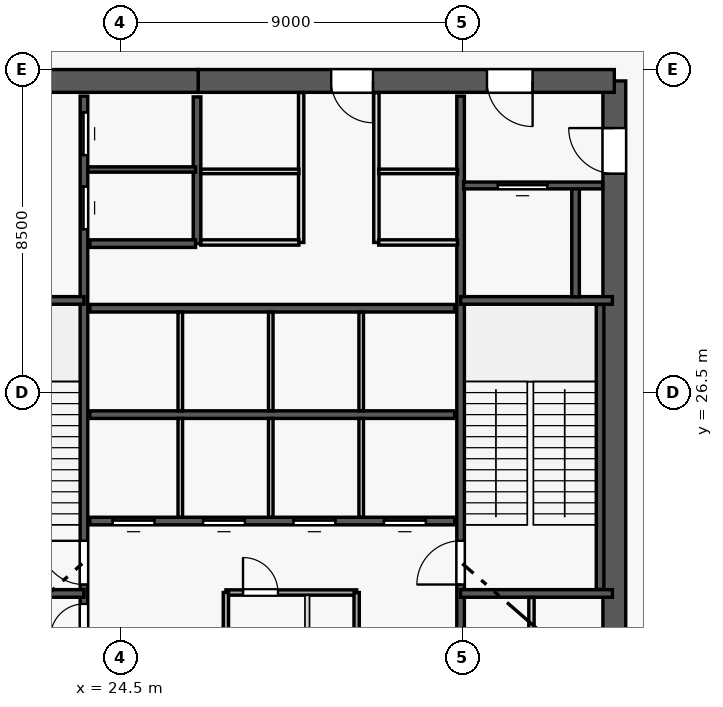
"""IFC4 building model, lengths in metres.
Left out: names, types, materials, properties, quantities, classifications, styles, units other than length and angle.
Written with IfcOpenShell. Run it as: python <this file> out.ifc"""

import sys

from ifc_helpers import new_model, si_unit, direction, frame, frame_2d, origin, origin_with_axes, origin_2d, place, context, subcontext, project, spatial, rectangle, circle, extrude, source, transform, mapped, element, fill, save


model = new_model("IFC4")
c1 = context("Model", 3, precision=1e-05, world=origin(), true_north=direction((0.0, 1.0)))
c2 = subcontext(c1, "Body", "Model", "MODEL_VIEW")
j1 = project(units=[si_unit("LENGTHUNIT", "METRE"), si_unit("PLANEANGLEUNIT", "RADIAN")], contexts=[c1])
p1 = place(None, origin())
s1 = spatial("IfcSite", under=j1, at=p1, CompositionType="ELEMENT")
p2 = place(p1, origin())
s2 = spatial("IfcBuilding", under=s1, at=p2, CompositionType="ELEMENT")
p3 = place(p2, frame((0.0, 0.0, 9.0)))
s3 = spatial("IfcBuildingStorey", under=s2, at=p3, CompositionType="ELEMENT", Elevation=9.0)
p4 = place(p3, frame((37.5, 18.3, 0.0), z_axis=(0.0, 0.0, 1.0), x_axis=(0.0, 1.0, 0.0)))
e1 = element("IfcWall", 1, at=p4, inside=s3, PredefinedType="SHEAR", context=c2, shape_type="SweptSolid", body=[
    extrude(rectangle(XDim=16.4, YDim=0.6, at=frame_2d((8.2, 0.0))), origin(), (0.0, 0.0, 1.0), 4.2),
])
p5 = place(p4, frame((13.96, 0.0, 0.0)))
e2 = element("IfcOpeningElement", 2, at=p5, cuts=e1, PredefinedType="OPENING", context=c2, shape_type="SweptSolid", body=[
    extrude(rectangle(XDim=1.2, YDim=2.15, at=frame_2d((0.6, 1.075))), frame((0.0, 0.31, 0.0), z_axis=(0.0, -1.0, 0.0), x_axis=(1.0, 0.0, 0.0)), (0.0, 0.0, 1.0), 0.62),
])
p6 = place(p3, frame((37.5, 34.7, 0.0), z_axis=(0.0, 0.0, 1.0), x_axis=(-1.0, 0.0, 0.0)))
e3 = element("IfcWall", 3, at=p6, inside=s3, PredefinedType="SHEAR", context=c2, shape_type="SweptSolid", body=[
    extrude(rectangle(XDim=10.95, YDim=0.6, at=frame_2d((5.475, 0.0))), origin(), (0.0, 0.0, 1.0), 4.2),
])
p7 = place(p6, frame((2.15, 0.0, 0.0)))
e4 = element("IfcOpeningElement", 4, at=p7, cuts=e3, PredefinedType="OPENING", context=c2, shape_type="SweptSolid", body=[
    extrude(rectangle(XDim=1.2, YDim=2.15, at=frame_2d((0.6, 1.075))), frame((0.0, 0.31, 0.0), z_axis=(0.0, -1.0, 0.0), x_axis=(1.0, 0.0, 0.0)), (0.0, 0.0, 1.0), 0.62),
])
p8 = place(p6, frame((6.35, 0.0, 0.0)))
e5 = element("IfcOpeningElement", 5, at=p8, cuts=e3, PredefinedType="OPENING", context=c2, shape_type="SweptSolid", body=[
    extrude(rectangle(XDim=1.1, YDim=2.15, at=frame_2d((0.55, 1.075))), frame((0.0, 0.31, 0.0), z_axis=(0.0, -1.0, 0.0), x_axis=(1.0, 0.0, 0.0)), (0.0, 0.0, 1.0), 0.62),
])
p9 = place(p3, frame((26.55, 34.7, 0.0), z_axis=(0.0, 0.0, 1.0), x_axis=(-1.0, 0.0, 0.0)))
e6 = element("IfcWall", 6, at=p9, inside=s3, PredefinedType="SHEAR", context=c2, shape_type="SweptSolid", body=[
    extrude(rectangle(XDim=7.05, YDim=0.6, at=frame_2d((3.525, 0.0))), origin(), (0.0, 0.0, 1.0), 4.2),
])
p10 = place(p9, frame((4.25, 0.0, 0.0)))
e7 = element("IfcOpeningElement", 7, at=p10, cuts=e6, PredefinedType="OPENING", context=c2, shape_type="SweptSolid", body=[
    extrude(rectangle(XDim=1.1, YDim=2.15, at=frame_2d((0.55, 1.075))), frame((0.0, 0.31, 0.0), z_axis=(0.0, -1.0, 0.0), x_axis=(1.0, 0.0, 0.0)), (0.0, 0.0, 1.0), 0.62),
])
m1 = source(origin_with_axes(), c2, "Body", "SweptSolid", [
    extrude(circle(Radius=0.9, at=origin_2d()), origin(), (0.0, 0.0, 1.0), 4.5),
])
for number, where, z_axis, x_axis in (
    (8, (26.55, 34.7, 0.0), (0.0, 0.0, 1.0), (1.0, 0.0, 0.0)),
    (9, (37.5, 34.7, 0.0), (0.0, 0.0, 1.0), (1.0, 0.0, 0.0)),
):
    element("IfcColumn", number, at=place(p3, frame(where, z_axis=z_axis, x_axis=x_axis)), inside=s3, PredefinedType="COLUMN", context=c2, shape_type="MappedRepresentation", body=[
        mapped(m1, transform((0.0, 0.0, 0.0), scale=1.0)),
    ])
m2 = source(origin_with_axes(), c2, "Body", "SweptSolid", [
    extrude(rectangle(XDim=1.2, YDim=1.2, at=origin_2d()), origin(), (0.0, 0.0, 1.0), 4.5),
])
for number, where, z_axis, x_axis in (
    (10, (23.55, 29.0, 0.0), (0.0, 0.0, 1.0), (1.0, 0.0, 0.0)),
    (11, (33.45, 29.0, 0.0), (0.0, 0.0, 1.0), (1.0, 0.0, 0.0)),
):
    element("IfcColumn", number, at=place(p3, frame(where, z_axis=z_axis, x_axis=x_axis)), inside=s3, PredefinedType="COLUMN", context=c2, shape_type="MappedRepresentation", body=[
        mapped(m2, transform((0.0, 0.0, 0.0), scale=1.0)),
    ])
p11 = place(p3, frame((23.545, 18.7, 0.0), z_axis=(0.0, 0.0, 1.0), x_axis=(0.0, 1.0, 0.0)))
e12 = element("IfcWall", 12, at=p11, inside=s3, PredefinedType="SHEAR", context=c2, shape_type="SweptSolid", body=[
    extrude(rectangle(XDim=15.6, YDim=0.2, at=frame_2d((7.8, 0.0))), origin(), (0.0, 0.0, 1.0), 4.2),
])
p12 = place(p11, frame((2.75, 0.0, 0.0)))
e13 = element("IfcOpeningElement", 13, at=p12, cuts=e12, PredefinedType="OPENING", context=c2, shape_type="SweptSolid", body=[
    extrude(rectangle(XDim=1.15, YDim=2.15, at=frame_2d((0.575, 1.075))), frame((0.0, 0.11, 0.0), z_axis=(0.0, -1.0, 0.0), x_axis=(1.0, 0.0, 0.0)), (0.0, 0.0, 1.0), 0.22),
])
p13 = place(p11, frame((0.14, 0.0, 0.0)))
e14 = element("IfcOpeningElement", 14, at=p13, cuts=e12, PredefinedType="OPENING", context=c2, shape_type="SweptSolid", body=[
    extrude(rectangle(XDim=0.88, YDim=2.1, at=frame_2d((0.44, 1.05))), frame((0.0, 0.11, 0.0), z_axis=(0.0, -1.0, 0.0), x_axis=(1.0, 0.0, 0.0)), (0.0, 0.0, 1.0), 0.22),
])
p14 = place(p11, frame((1.36, 0.0, 0.0)))
e15 = element("IfcOpeningElement", 15, at=p14, cuts=e12, PredefinedType="OPENING", context=c2, shape_type="SweptSolid", body=[
    extrude(rectangle(XDim=0.88, YDim=2.1, at=frame_2d((0.44, 1.05))), frame((0.0, 0.11, 0.0), z_axis=(0.0, -1.0, 0.0), x_axis=(1.0, 0.0, 0.0)), (0.0, 0.0, 1.0), 0.22),
])
p15 = place(p11, frame((12.1, 0.0, 0.0)))
e16 = element("IfcOpeningElement", 16, at=p15, cuts=e12, PredefinedType="OPENING", context=c2, shape_type="SweptSolid", body=[
    extrude(rectangle(XDim=1.12, YDim=2.15, at=frame_2d((0.56, 1.075))), frame((0.0, 0.11, 0.0), z_axis=(0.0, -1.0, 0.0), x_axis=(1.0, 0.0, 0.0)), (0.0, 0.0, 1.0), 0.22),
])
p16 = place(p11, frame((14.05, 0.0, 0.0)))
e17 = element("IfcOpeningElement", 17, at=p16, cuts=e12, PredefinedType="OPENING", context=c2, shape_type="SweptSolid", body=[
    extrude(rectangle(XDim=1.12, YDim=2.15, at=frame_2d((0.56, 1.075))), frame((0.0, 0.11, 0.0), z_axis=(0.0, -1.0, 0.0), x_axis=(1.0, 0.0, 0.0)), (0.0, 0.0, 1.0), 0.22),
])
p17 = place(p3, frame((33.455, 18.7, 0.0), z_axis=(0.0, 0.0, 1.0), x_axis=(0.0, 1.0, 0.0)))
e18 = element("IfcWall", 18, at=p17, inside=s3, PredefinedType="SHEAR", context=c2, shape_type="SweptSolid", body=[
    extrude(rectangle(XDim=15.6, YDim=0.2, at=frame_2d((7.8, 0.0))), origin(), (0.0, 0.0, 1.0), 4.2),
])
p18 = place(p17, frame((2.75, 0.0, 0.0)))
e19 = element("IfcOpeningElement", 19, at=p18, cuts=e18, PredefinedType="OPENING", context=c2, shape_type="SweptSolid", body=[
    extrude(rectangle(XDim=1.15, YDim=2.15, at=frame_2d((0.575, 1.075))), frame((0.0, 0.11, 0.0), z_axis=(0.0, -1.0, 0.0), x_axis=(1.0, 0.0, 0.0)), (0.0, 0.0, 1.0), 0.22),
])
p19 = place(p17, frame((0.55, 0.0, 0.0)))
e20 = element("IfcOpeningElement", 20, at=p19, cuts=e18, PredefinedType="OPENING", context=c2, shape_type="SweptSolid", body=[
    extrude(rectangle(XDim=0.94, YDim=2.1, at=frame_2d((0.47, 1.05))), frame((0.0, 0.11, 0.0), z_axis=(0.0, -1.0, 0.0), x_axis=(1.0, 0.0, 0.0)), (0.0, 0.0, 1.0), 0.22),
])
p20 = place(p3, frame((23.7, 23.12, 0.0), z_axis=(0.0, 0.0, 1.0), x_axis=(1.0, 0.0, 0.0)))
e21 = element("IfcWall", 21, at=p20, inside=s3, PredefinedType="SHEAR", context=c2, shape_type="SweptSolid", body=[
    extrude(rectangle(XDim=9.6, YDim=0.2, at=frame_2d((4.8, 0.0))), origin(), (0.0, 0.0, 1.0), 4.2),
])
p21 = place(p20, frame((0.6, 0.0, 0.0)))
e22 = element("IfcOpeningElement", 22, at=p21, cuts=e21, PredefinedType="OPENING", context=c2, shape_type="SweptSolid", body=[
    extrude(rectangle(XDim=1.1, YDim=2.15, at=frame_2d((0.55, 1.075))), frame((0.0, 0.11, 0.0), z_axis=(0.0, -1.0, 0.0), x_axis=(1.0, 0.0, 0.0)), (0.0, 0.0, 1.0), 0.22),
])
p22 = place(p20, frame((2.98, 0.0, 0.0)))
e23 = element("IfcOpeningElement", 23, at=p22, cuts=e21, PredefinedType="OPENING", context=c2, shape_type="SweptSolid", body=[
    extrude(rectangle(XDim=1.1, YDim=2.15, at=frame_2d((0.55, 1.075))), frame((0.0, 0.11, 0.0), z_axis=(0.0, -1.0, 0.0), x_axis=(1.0, 0.0, 0.0)), (0.0, 0.0, 1.0), 0.22),
])
p23 = place(p20, frame((5.36, 0.0, 0.0)))
e24 = element("IfcOpeningElement", 24, at=p23, cuts=e21, PredefinedType="OPENING", context=c2, shape_type="SweptSolid", body=[
    extrude(rectangle(XDim=1.1, YDim=2.15, at=frame_2d((0.55, 1.075))), frame((0.0, 0.11, 0.0), z_axis=(0.0, -1.0, 0.0), x_axis=(1.0, 0.0, 0.0)), (0.0, 0.0, 1.0), 0.22),
])
p24 = place(p20, frame((7.74, 0.0, 0.0)))
e25 = element("IfcOpeningElement", 25, at=p24, cuts=e21, PredefinedType="OPENING", context=c2, shape_type="SweptSolid", body=[
    extrude(rectangle(XDim=1.1, YDim=2.15, at=frame_2d((0.55, 1.075))), frame((0.0, 0.11, 0.0), z_axis=(0.0, -1.0, 0.0), x_axis=(1.0, 0.0, 0.0)), (0.0, 0.0, 1.0), 0.22),
])
for number, where, z_axis, x_axis in (
    (26, (23.7, 25.92, 0.0), (0.0, 0.0, 1.0), (1.0, 0.0, 0.0)),
    (27, (23.7, 28.72, 0.0), (0.0, 0.0, 1.0), (1.0, 0.0, 0.0)),
):
    element("IfcWall", number, at=place(p3, frame(where, z_axis=z_axis, x_axis=x_axis)), inside=s3, PredefinedType="SHEAR", context=c2, shape_type="SweptSolid", body=[
        extrude(rectangle(XDim=9.6, YDim=0.2, at=frame_2d((4.8, 0.0))), origin(), (0.0, 0.0, 1.0), 4.2),
    ])
p25 = place(p3, frame((37.125, 21.32, 0.0), z_axis=(0.0, 0.0, 1.0), x_axis=(0.0, 1.0, 0.0)))
e28 = element("IfcWall", 28, at=p25, inside=s3, PredefinedType="SHEAR", context=c2, shape_type="SweptSolid", body=[
    extrude(rectangle(XDim=7.5, YDim=0.2, at=frame_2d((3.75, 0.0))), origin(), (0.0, 0.0, 1.0), 4.2),
])
for number, where, z_axis, x_axis in (
    (29, (33.455, 21.215, 0.0), (0.0, 0.0, 1.0), (1.0, 0.0, 0.0)),
    (30, (33.455, 28.925, 0.0), (0.0, 0.0, 1.0), (1.0, 0.0, 0.0)),
    (31, (19.55, 21.215, 0.0), (0.0, 0.0, 1.0), (1.0, 0.0, 0.0)),
    (32, (19.55, 28.925, 0.0), (0.0, 0.0, 1.0), (1.0, 0.0, 0.0)),
):
    element("IfcWall", number, at=place(p3, frame(where, z_axis=z_axis, x_axis=x_axis)), inside=s3, PredefinedType="SHEAR", context=c2, shape_type="SweptSolid", body=[
        extrude(rectangle(XDim=3.995, YDim=0.2, at=frame_2d((1.998, 0.0))), origin(), (0.0, 0.0, 1.0), 4.2),
    ])
p26 = place(p3, frame((26.52, 30.42, 0.0), z_axis=(0.0, 0.0, 1.0), x_axis=(0.0, 1.0, 0.0)))
e33 = element("IfcWall", 33, at=p26, inside=s3, PredefinedType="SHEAR", context=c2, shape_type="SweptSolid", body=[
    extrude(rectangle(XDim=3.86, YDim=0.2, at=frame_2d((1.93, 0.0))), origin(), (0.0, 0.0, 1.0), 4.2),
])
p27 = place(p3, frame((36.48, 29.02, 0.0), z_axis=(0.0, 0.0, 1.0), x_axis=(0.0, 1.0, 0.0)))
e34 = element("IfcWall", 34, at=p27, inside=s3, PredefinedType="SHEAR", context=c2, shape_type="SweptSolid", body=[
    extrude(rectangle(XDim=2.86, YDim=0.2, at=frame_2d((1.43, 0.0))), origin(), (0.0, 0.0, 1.0), 4.2),
])
p28 = place(p3, frame((23.7, 30.42, 0.0), z_axis=(0.0, 0.0, 1.0), x_axis=(1.0, 0.0, 0.0)))
e35 = element("IfcWall", 35, at=p28, inside=s3, PredefinedType="SHEAR", context=c2, shape_type="SweptSolid", body=[
    extrude(rectangle(XDim=2.78, YDim=0.2, at=frame_2d((1.39, 0.0))), origin(), (0.0, 0.0, 1.0), 4.2),
])
for number, where, z_axis, x_axis in (
    (36, (29.26, 30.45, 0.0), (0.0, 0.0, 1.0), (0.0, 1.0, 0.0)),
    (37, (31.24, 30.45, 0.0), (0.0, 0.0, 1.0), (0.0, 1.0, 0.0)),
):
    element("IfcWall", number, at=place(p3, frame(where, z_axis=z_axis, x_axis=x_axis)), inside=s3, PredefinedType="PARTITIONING", context=c2, shape_type="SweptSolid", body=[
        extrude(rectangle(XDim=3.943, YDim=0.14, at=frame_2d((1.972, 0.0))), origin(), (0.0, 0.0, 1.0), 4.2),
    ])
p29 = place(p3, frame((33.535, 31.95, 0.0), z_axis=(0.0, 0.0, 1.0), x_axis=(1.0, 0.0, 0.0)))
e38 = element("IfcWall", 38, at=p29, inside=s3, PredefinedType="PARTITIONING", context=c2, shape_type="SweptSolid", body=[
    extrude(rectangle(XDim=3.658, YDim=0.18, at=frame_2d((1.829, 0.0))), origin(), (0.0, 0.0, 1.0), 4.2),
])
p30 = place(p29, frame((0.9, 0.0, 0.0)))
e39 = element("IfcOpeningElement", 39, at=p30, cuts=e38, PredefinedType="OPENING", context=c2, shape_type="SweptSolid", body=[
    extrude(rectangle(XDim=1.3, YDim=2.2, at=frame_2d((0.65, 1.1))), frame((0.0, 0.1, 0.0), z_axis=(0.0, -1.0, 0.0), x_axis=(1.0, 0.0, 0.0)), (0.0, 0.0, 1.0), 0.2),
])
p31 = place(p3, frame((27.28, 21.24, 0.0), z_axis=(0.0, 0.0, 1.0), x_axis=(1.0, 0.0, 0.0)))
e40 = element("IfcWall", 40, at=p31, inside=s3, PredefinedType="PARTITIONING", context=c2, shape_type="SweptSolid", body=[
    extrude(rectangle(XDim=3.44, YDim=0.14, at=frame_2d((1.72, 0.0))), origin(), (0.0, 0.0, 1.0), 4.2),
])
p32 = place(p31, frame((0.45, 0.0, 0.0)))
e41 = element("IfcOpeningElement", 41, at=p32, cuts=e40, PredefinedType="OPENING", context=c2, shape_type="SweptSolid", body=[
    extrude(rectangle(XDim=0.92, YDim=2.1, at=frame_2d((0.46, 1.05))), frame((0.0, 0.08, 0.0), z_axis=(0.0, -1.0, 0.0), x_axis=(1.0, 0.0, 0.0)), (0.0, 0.0, 1.0), 0.16),
])
p33 = place(p3, frame((23.652, 32.37, 0.0), z_axis=(0.0, 0.0, 1.0), x_axis=(1.0, 0.0, 0.0)))
e42 = element("IfcWall", 42, at=p33, inside=s3, PredefinedType="PARTITIONING", context=c2, shape_type="SweptSolid", body=[
    extrude(rectangle(XDim=2.828, YDim=0.14, at=frame_2d((1.414, 0.0))), origin(), (0.0, 0.0, 1.0), 4.2),
])
p34 = place(p3, frame((27.28, 18.55, 0.0), z_axis=(0.0, 0.0, 1.0), x_axis=(0.0, 1.0, 0.0)))
e43 = element("IfcWall", 43, at=p34, inside=s3, PredefinedType="PARTITIONING", context=c2, shape_type="SweptSolid", body=[
    extrude(rectangle(XDim=2.69, YDim=0.14, at=frame_2d((1.345, 0.0))), origin(), (0.0, 0.0, 1.0), 4.2),
])
p35 = place(p3, frame((30.72, 18.55, 0.0), z_axis=(0.0, 0.0, 1.0), x_axis=(0.0, 1.0, 0.0)))
e44 = element("IfcWall", 44, at=p35, inside=s3, PredefinedType="PARTITIONING", context=c2, shape_type="SweptSolid", body=[
    extrude(rectangle(XDim=2.69, YDim=0.14, at=frame_2d((1.345, 0.0))), origin(), (0.0, 0.0, 1.0), 4.2),
])
p36 = place(p35, frame((0.7, 0.0, 0.0)))
e45 = element("IfcOpeningElement", 45, at=p36, cuts=e44, PredefinedType="OPENING", context=c2, shape_type="SweptSolid", body=[
    extrude(rectangle(XDim=0.86, YDim=2.1, at=frame_2d((0.43, 1.05))), frame((0.0, 0.08, 0.0), z_axis=(0.0, -1.0, 0.0), x_axis=(1.0, 0.0, 0.0)), (0.0, 0.0, 1.0), 0.16),
])
for number, where, z_axis, x_axis in (
    (46, (26.08, 23.22, 0.0), (0.0, 0.0, 1.0), (0.0, 1.0, 0.0)),
    (47, (28.46, 23.22, 0.0), (0.0, 0.0, 1.0), (0.0, 1.0, 0.0)),
    (48, (30.84, 23.22, 0.0), (0.0, 0.0, 1.0), (0.0, 1.0, 0.0)),
    (49, (26.08, 26.02, 0.0), (0.0, 0.0, 1.0), (0.0, 1.0, 0.0)),
    (50, (28.46, 26.02, 0.0), (0.0, 0.0, 1.0), (0.0, 1.0, 0.0)),
    (51, (30.84, 26.02, 0.0), (0.0, 0.0, 1.0), (0.0, 1.0, 0.0)),
):
    element("IfcWall", number, at=place(p3, frame(where, z_axis=z_axis, x_axis=x_axis)), inside=s3, PredefinedType="PARTITIONING", context=c2, shape_type="SweptSolid", body=[
        extrude(rectangle(XDim=2.6, YDim=0.12, at=frame_2d((1.3, 0.0))), origin(), (0.0, 0.0, 1.0), 4.2),
    ])
p37 = place(p3, frame((26.62, 30.45, 0.0), z_axis=(0.0, 0.0, 1.0), x_axis=(1.0, 0.0, 0.0)))
e52 = element("IfcWall", 52, at=p37, inside=s3, PredefinedType="PARTITIONING", context=c2, shape_type="SweptSolid", body=[
    extrude(rectangle(XDim=2.58, YDim=0.14, at=frame_2d((1.29, 0.0))), origin(), (0.0, 0.0, 1.0), 4.2),
])
p38 = place(p3, frame((26.62, 32.32, 0.0), z_axis=(0.0, 0.0, 1.0), x_axis=(1.0, 0.0, 0.0)))
e53 = element("IfcWall", 53, at=p38, inside=s3, PredefinedType="PARTITIONING", context=c2, shape_type="SweptSolid", body=[
    extrude(rectangle(XDim=2.58, YDim=0.12, at=frame_2d((1.29, 0.0))), origin(), (0.0, 0.0, 1.0), 4.2),
])
p39 = place(p3, frame((29.42, 18.607, 0.0), z_axis=(0.0, 0.0, 1.0), x_axis=(0.0, 1.0, 0.0)))
e54 = element("IfcWall", 54, at=p39, inside=s3, PredefinedType="PARTITIONING", context=c2, shape_type="SweptSolid", body=[
    extrude(rectangle(XDim=2.56, YDim=0.12, at=frame_2d((1.28, 0.0))), origin(), (0.0, 0.0, 1.0), 4.2),
])
p40 = place(p3, frame((35.32, 18.607, 0.0), z_axis=(0.0, 0.0, 1.0), x_axis=(0.0, 1.0, 0.0)))
e55 = element("IfcWall", 55, at=p40, inside=s3, PredefinedType="PARTITIONING", context=c2, shape_type="SweptSolid", body=[
    extrude(rectangle(XDim=2.503, YDim=0.14, at=frame_2d((1.251, 0.0))), origin(), (0.0, 0.0, 1.0), 4.2),
])
p41 = place(p3, frame((31.3, 30.45, 0.0), z_axis=(0.0, 0.0, 1.0), x_axis=(1.0, 0.0, 0.0)))
e56 = element("IfcWall", 56, at=p41, inside=s3, PredefinedType="PARTITIONING", context=c2, shape_type="SweptSolid", body=[
    extrude(rectangle(XDim=2.075, YDim=0.14, at=frame_2d((1.038, 0.0))), origin(), (0.0, 0.0, 1.0), 4.2),
])
p42 = place(p3, frame((31.3, 32.32, 0.0), z_axis=(0.0, 0.0, 1.0), x_axis=(1.0, 0.0, 0.0)))
e57 = element("IfcWall", 57, at=p42, inside=s3, PredefinedType="PARTITIONING", context=c2, shape_type="SweptSolid", body=[
    extrude(rectangle(XDim=2.075, YDim=0.12, at=frame_2d((1.038, 0.0))), origin(), (0.0, 0.0, 1.0), 4.2),
])
m3 = source(origin_with_axes(), c2, "Body", "SweptSolid", [
    extrude(rectangle(XDim=1.15, YDim=2.15, at=frame_2d((0.575, 1.075))), frame((0.0, 0.025, 0.0), z_axis=(0.0, -1.0, 0.0), x_axis=(1.0, 0.0, 0.0)), (0.0, 0.0, 1.0), 0.05),
])
p43 = place(p12, origin())
e58 = element("IfcDoor", 58, at=p43, inside=s3, OperationType="SINGLE_SWING_RIGHT", PredefinedType="DOOR", context=c2, shape_type="MappedRepresentation", body=[
    mapped(m3, transform((0.0, 0.0, 0.0), scale=1.0)),
])
fill(e13, e58)
p44 = place(p18, origin())
e59 = element("IfcDoor", 59, at=p44, inside=s3, OperationType="SINGLE_SWING_LEFT", PredefinedType="DOOR", context=c2, shape_type="MappedRepresentation", body=[
    mapped(m3, transform((0.0, 0.0, 0.0), scale=1.0)),
])
fill(e19, e59)
m4 = source(origin_with_axes(), c2, "Body", "SweptSolid", [
    extrude(rectangle(XDim=1.2, YDim=2.15, at=frame_2d((0.6, 1.075))), frame((0.0, 0.025, 0.0), z_axis=(0.0, -1.0, 0.0), x_axis=(1.0, 0.0, 0.0)), (0.0, 0.0, 1.0), 0.05),
])
p45 = place(p5, origin())
e60 = element("IfcDoor", 60, at=p45, inside=s3, OperationType="SINGLE_SWING_RIGHT", PredefinedType="DOOR", context=c2, shape_type="MappedRepresentation", body=[
    mapped(m4, transform((0.0, 0.0, 0.0), scale=1.0)),
])
fill(e2, e60)
p46 = place(p7, origin())
e61 = element("IfcDoor", 61, at=p46, inside=s3, OperationType="SINGLE_SWING_LEFT", PredefinedType="DOOR", context=c2, shape_type="MappedRepresentation", body=[
    mapped(m4, transform((0.0, 0.0, 0.0), scale=1.0)),
])
fill(e4, e61)
m5 = source(origin_with_axes(), c2, "Body", "SweptSolid", [
    extrude(rectangle(XDim=1.3, YDim=2.2, at=frame_2d((0.65, 1.1))), frame((0.0, 0.025, 0.0), z_axis=(0.0, -1.0, 0.0), x_axis=(1.0, 0.0, 0.0)), (0.0, 0.0, 1.0), 0.05),
])
p47 = place(p30, origin())
e62 = element("IfcDoor", 62, at=p47, inside=s3, OperationType="SLIDING_TO_LEFT", PredefinedType="DOOR", context=c2, shape_type="MappedRepresentation", body=[
    mapped(m5, transform((0.0, 0.0, 0.0), scale=1.0)),
])
fill(e39, e62)
m6 = source(origin_with_axes(), c2, "Body", "SweptSolid", [
    extrude(rectangle(XDim=0.88, YDim=2.1, at=frame_2d((0.44, 1.05))), frame((0.0, 0.025, 0.0), z_axis=(0.0, -1.0, 0.0), x_axis=(1.0, 0.0, 0.0)), (0.0, 0.0, 1.0), 0.05),
])
p48 = place(p14, origin())
e63 = element("IfcDoor", 63, at=p48, inside=s3, OperationType="SINGLE_SWING_LEFT", PredefinedType="DOOR", context=c2, shape_type="MappedRepresentation", body=[
    mapped(m6, transform((0.0, 0.0, 0.0), scale=1.0)),
])
fill(e15, e63)
m7 = source(origin_with_axes(), c2, "Body", "SweptSolid", [
    extrude(rectangle(XDim=0.92, YDim=2.1, at=frame_2d((0.46, 1.05))), frame((0.0, 0.025, 0.0), z_axis=(0.0, -1.0, 0.0), x_axis=(1.0, 0.0, 0.0)), (0.0, 0.0, 1.0), 0.05),
])
p49 = place(p32, origin())
e64 = element("IfcDoor", 64, at=p49, inside=s3, OperationType="SINGLE_SWING_LEFT", PredefinedType="DOOR", context=c2, shape_type="MappedRepresentation", body=[
    mapped(m7, transform((0.0, 0.0, 0.0), scale=1.0)),
])
fill(e41, e64)
m8 = source(origin_with_axes(), c2, "Body", "SweptSolid", [
    extrude(rectangle(XDim=1.1, YDim=2.15, at=frame_2d((0.55, 1.075))), frame((0.0, 0.025, 0.0), z_axis=(0.0, -1.0, 0.0), x_axis=(1.0, 0.0, 0.0)), (0.0, 0.0, 1.0), 0.05),
])
p50 = place(p21, origin())
e65 = element("IfcDoor", 65, at=p50, inside=s3, OperationType="SLIDING_TO_LEFT", PredefinedType="DOOR", context=c2, shape_type="MappedRepresentation", body=[
    mapped(m8, transform((0.0, 0.0, 0.0), scale=1.0)),
])
fill(e22, e65)
p51 = place(p22, origin())
e66 = element("IfcDoor", 66, at=p51, inside=s3, OperationType="SLIDING_TO_RIGHT", PredefinedType="DOOR", context=c2, shape_type="MappedRepresentation", body=[
    mapped(m8, transform((0.0, 0.0, 0.0), scale=1.0)),
])
fill(e23, e66)
p52 = place(p23, origin())
e67 = element("IfcDoor", 67, at=p52, inside=s3, OperationType="SLIDING_TO_LEFT", PredefinedType="DOOR", context=c2, shape_type="MappedRepresentation", body=[
    mapped(m8, transform((0.0, 0.0, 0.0), scale=1.0)),
])
fill(e24, e67)
p53 = place(p24, origin())
e68 = element("IfcDoor", 68, at=p53, inside=s3, OperationType="SLIDING_TO_RIGHT", PredefinedType="DOOR", context=c2, shape_type="MappedRepresentation", body=[
    mapped(m8, transform((0.0, 0.0, 0.0), scale=1.0)),
])
fill(e25, e68)
p54 = place(p8, origin())
e69 = element("IfcDoor", 69, at=p54, inside=s3, OperationType="SINGLE_SWING_LEFT", PredefinedType="DOOR", context=c2, shape_type="MappedRepresentation", body=[
    mapped(m8, transform((0.0, 0.0, 0.0), scale=1.0)),
])
fill(e5, e69)
m9 = source(origin_with_axes(), c2, "Body", "SweptSolid", [
    extrude(rectangle(XDim=1.12, YDim=2.15, at=frame_2d((0.56, 1.075))), frame((0.0, 0.025, 0.0), z_axis=(0.0, -1.0, 0.0), x_axis=(1.0, 0.0, 0.0)), (0.0, 0.0, 1.0), 0.05),
])
p55 = place(p15, origin())
e70 = element("IfcDoor", 70, at=p55, inside=s3, OperationType="SLIDING_TO_LEFT", PredefinedType="DOOR", context=c2, shape_type="MappedRepresentation", body=[
    mapped(m9, transform((0.0, 0.0, 0.0), scale=1.0)),
])
fill(e16, e70)
p56 = place(p16, origin())
e71 = element("IfcDoor", 71, at=p56, inside=s3, OperationType="SLIDING_TO_RIGHT", PredefinedType="DOOR", context=c2, shape_type="MappedRepresentation", body=[
    mapped(m9, transform((0.0, 0.0, 0.0), scale=1.0)),
])
fill(e17, e71)
save(model, sys.argv[1])
